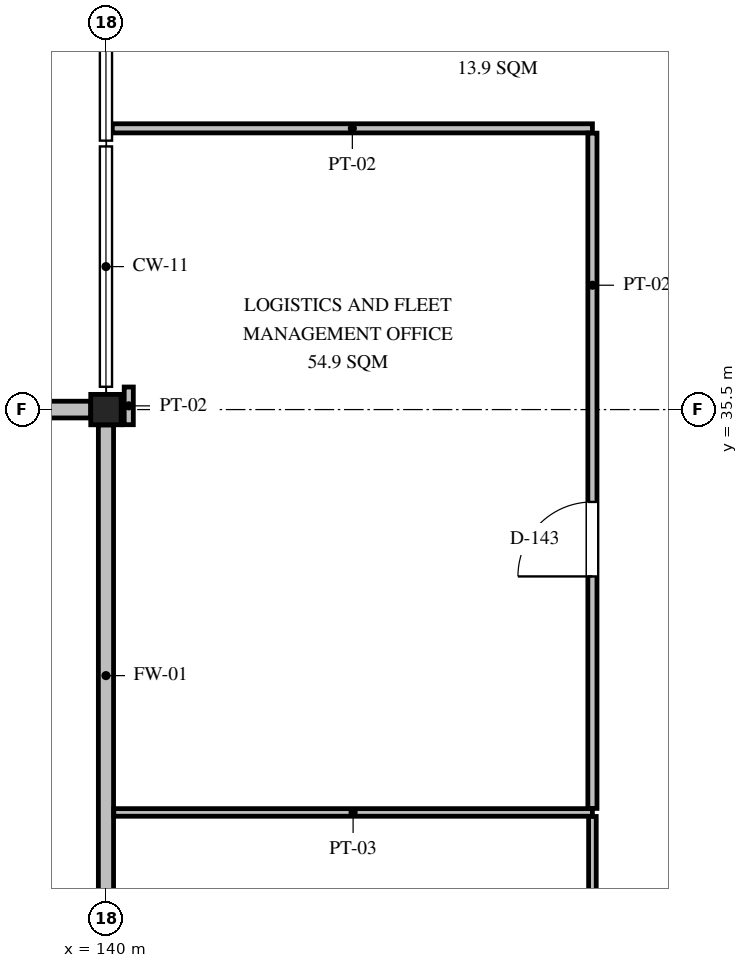
"""IFC4 building model, lengths in metres.
Left out: names, types, materials, properties, quantities, classifications, styles, units other than length and angle.
Written with IfcOpenShell. Run it as: python <this file> out.ifc"""

import sys

from ifc_helpers import new_model, si_unit, direction, frame, frame_2d, origin, origin_2d, place, context, subcontext, project, spatial, rectangle, i_section, extrude, element, fill, save


model = new_model("IFC4")
c1 = context("Model", 3, precision=1e-05, world=origin(), true_north=direction((0.0, 1.0)))
c2 = subcontext(c1, "Body", "Model", "MODEL_VIEW")
j1 = project(units=[si_unit("LENGTHUNIT", "METRE"), si_unit("PLANEANGLEUNIT", "RADIAN")], contexts=[c1])
p1 = place(None, origin())
s1 = spatial("IfcSite", under=j1, at=p1, CompositionType="ELEMENT")
p2 = place(p1, origin())
s2 = spatial("IfcBuilding", under=s1, at=p2, CompositionType="ELEMENT")
p3 = place(p2, frame((0.0, 0.0, 5.85)))
s3 = spatial("IfcBuildingStorey", under=s2, at=p3, CompositionType="ELEMENT", Elevation=5.85)
p4 = place(p3, frame((140.0, 35.5, 0.0), z_axis=(0.0, 0.0, 1.0), x_axis=(1.0, 0.0, 0.0)))
e1 = element("IfcColumn", 1, at=p4, inside=s3, PredefinedType="COLUMN", context=c2, shape_type="SweptSolid", body=[
    extrude(i_section(OverallWidth=0.4, OverallDepth=0.4, WebThickness=0.013, FlangeThickness=0.021, FilletRadius=0.022, at=origin_2d()), origin(), (0.0, 0.0, 1.0), 4.2),
])
p5 = place(p3, frame((132.275, 35.5, 0.0), z_axis=(0.0, 0.0, 1.0), x_axis=(1.0, 0.0, 0.0)))
e2 = element("IfcWall", 2, at=p5, inside=s3, PredefinedType="SOLIDWALL", context=c2, shape_type="SweptSolid", body=[
    extrude(rectangle(XDim=7.525, YDim=0.22, at=frame_2d((3.763, 0.0))), origin(), (0.0, 0.0, 1.0), 2.854),
])
p6 = place(p5, frame((2.6, 0.0, 1.2)))
e3 = element("IfcOpeningElement", 3, at=p6, cuts=e2, PredefinedType="OPENING", context=c2, shape_type="SweptSolid", body=[
    extrude(rectangle(XDim=1.25, YDim=1.25, at=frame_2d((0.625, 0.625))), frame((0.0, 0.12, 0.0), z_axis=(0.0, -1.0, 0.0), x_axis=(1.0, 0.0, 0.0)), (0.0, 0.0, 1.0), 0.24),
])
p7 = place(p3, frame((140.0, 28.702, 0.0), z_axis=(0.0, 0.0, 1.0), x_axis=(0.0, 1.0, 0.0)))
e4 = element("IfcWall", 4, at=p7, inside=s3, PredefinedType="PARTITIONING", context=c2, shape_type="SweptSolid", body=[
    extrude(rectangle(XDim=6.596, YDim=0.2, at=frame_2d((3.298, 0.0))), origin(), (0.0, 0.0, 1.0), 3.404),
])
p8 = place(p3, frame((140.103, 30.2, 0.0), z_axis=(0.0, 0.0, 1.0), x_axis=(1.0, 0.0, 0.0)))
e5 = element("IfcWall", 5, at=p8, inside=s3, PredefinedType="PARTITIONING", context=c2, shape_type="SweptSolid", body=[
    extrude(rectangle(XDim=6.297, YDim=0.1, at=frame_2d((3.148, 0.0))), origin(), (0.0, 0.0, 1.0), 3.96),
])
p9 = place(p3, frame((146.4, 20.653, 0.0), z_axis=(0.0, 0.0, 1.0), x_axis=(0.0, 1.0, 0.0)))
e6 = element("IfcWall", 6, at=p9, inside=s3, PredefinedType="PARTITIONING", context=c2, shape_type="SweptSolid", body=[
    extrude(rectangle(XDim=9.494, YDim=0.1, at=frame_2d((4.747, 0.0))), origin(), (0.0, 0.0, 1.0), 3.71),
])
p10 = place(p9, frame((4.247, 0.0, 0.0)))
e7 = element("IfcOpeningElement", 7, at=p10, cuts=e6, PredefinedType="OPENING", context=c2, shape_type="SweptSolid", body=[
    extrude(rectangle(XDim=1.0, YDim=2.1, at=frame_2d((0.5, 1.05))), frame((0.0, 0.06, 0.0), z_axis=(0.0, -1.0, 0.0), x_axis=(1.0, 0.0, 0.0)), (0.0, 0.0, 1.0), 0.12),
])
p11 = place(p3, frame((140.083, 39.2, 0.0), z_axis=(0.0, 0.0, 1.0), x_axis=(1.0, 0.0, 0.0)))
e8 = element("IfcWall", 8, at=p11, inside=s3, PredefinedType="PARTITIONING", context=c2, shape_type="SweptSolid", body=[
    extrude(rectangle(XDim=6.317, YDim=0.12, at=frame_2d((3.158, 0.0))), origin(), (0.0, 0.0, 1.0), 3.96),
])
p12 = place(p3, frame((140.3, 35.301, 0.0), z_axis=(0.0, 0.0, 1.0), x_axis=(0.0, 1.0, 0.0)))
e9 = element("IfcWall", 9, at=p12, inside=s3, PredefinedType="PARTITIONING", context=c2, shape_type="SweptSolid", body=[
    extrude(rectangle(XDim=0.496, YDim=0.12, at=frame_2d((0.248, 0.0))), origin(), (0.0, 0.0, 1.0), 3.96),
])
p13 = place(p3, frame((146.4, 30.253, 0.0), z_axis=(0.0, 0.0, 1.0), x_axis=(0.0, 1.0, 0.0)))
e10 = element("IfcWall", 10, at=p13, inside=s3, PredefinedType="PARTITIONING", context=c2, shape_type="SweptSolid", body=[
    extrude(rectangle(XDim=8.884, YDim=0.12, at=frame_2d((4.442, 0.0))), origin(), (0.0, 0.0, 1.0), 3.96),
])
p14 = place(p13, frame((3.052, 0.0, 0.0)))
e11 = element("IfcOpeningElement", 11, at=p14, cuts=e10, PredefinedType="OPENING", context=c2, shape_type="SweptSolid", body=[
    extrude(rectangle(XDim=0.98, YDim=2.1, at=frame_2d((0.49, 1.05))), frame((0.0, 0.07, 0.0), z_axis=(0.0, -1.0, 0.0), x_axis=(1.0, 0.0, 0.0)), (0.0, 0.0, 1.0), 0.14),
])
p15 = place(p14, origin())
e12 = element("IfcDoor", 12, at=p15, inside=s3, OperationType="SINGLE_SWING_LEFT", PredefinedType="DOOR", context=c2, shape_type="SweptSolid", body=[
    extrude(rectangle(XDim=0.98, YDim=2.1, at=frame_2d((0.49, 1.05))), frame((0.0, 0.025, 0.0), z_axis=(0.0, -1.0, 0.0), x_axis=(1.0, 0.0, 0.0)), (0.0, 0.0, 1.0), 0.05),
])
fill(e11, e12)
save(model, sys.argv[1])
